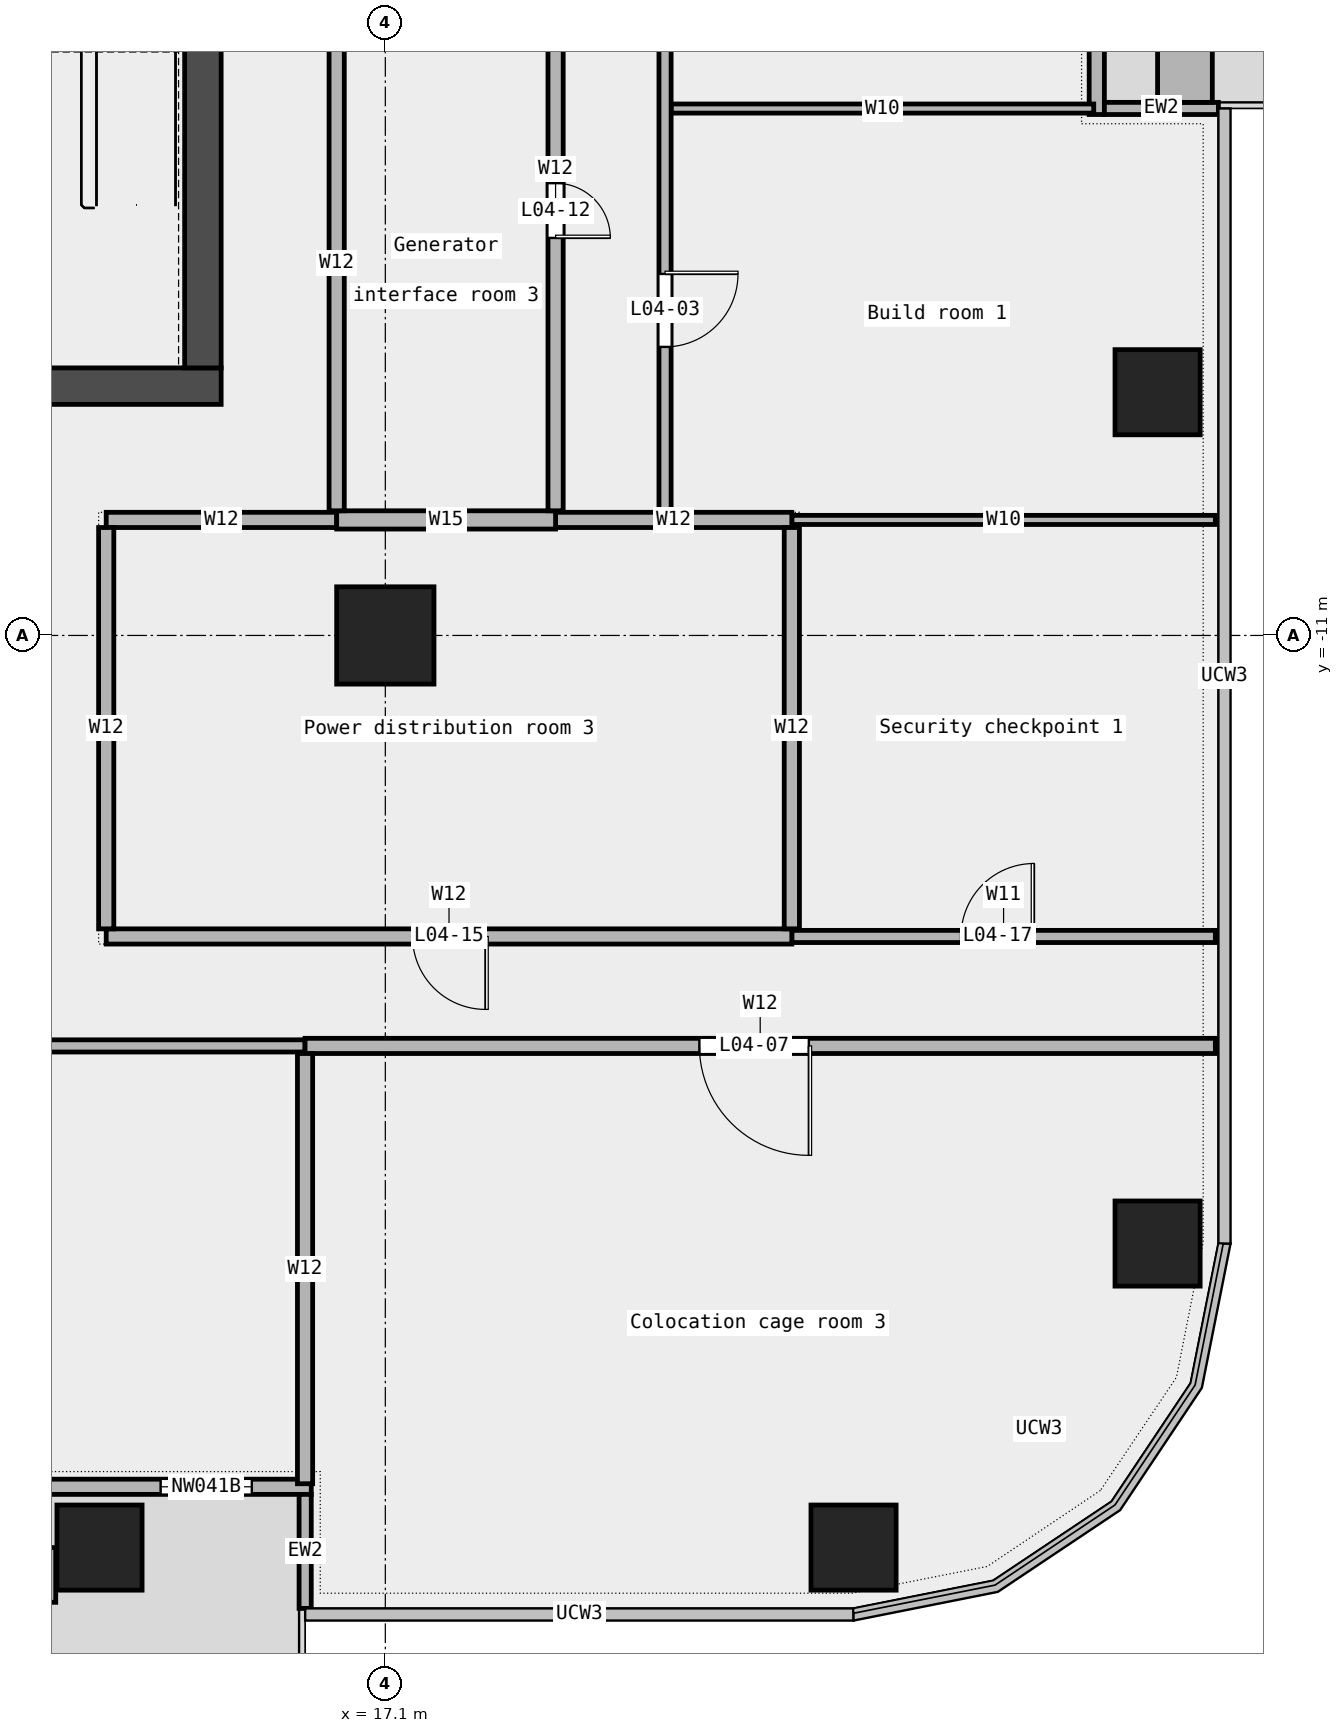
"""IFC4 building model, lengths in metres.
Left out: names, types, materials, properties, quantities, classifications, styles, units other than length and angle.
Written with IfcOpenShell. Run it as: python <this file> out.ifc"""

import sys

from ifc_helpers import new_model, si_unit, direction, frame, frame_2d, origin, origin_2d, place, context, subcontext, project, spatial, rectangle, extrude, element, fill, save


model = new_model("IFC4")
c1 = context("Model", 3, precision=1e-05, world=origin(), true_north=direction((0.0, 1.0)))
c2 = subcontext(c1, "Body", "Model", "MODEL_VIEW")
j1 = project(units=[si_unit("LENGTHUNIT", "METRE"), si_unit("PLANEANGLEUNIT", "RADIAN")], contexts=[c1])
p1 = place(None, origin())
s1 = spatial("IfcSite", under=j1, at=p1, CompositionType="ELEMENT")
p2 = place(p1, origin())
s2 = spatial("IfcBuilding", under=s1, at=p2, CompositionType="ELEMENT")
p3 = place(p2, frame((0.0, 0.0, 25.5)))
s3 = spatial("IfcBuildingStorey", under=s2, at=p3, CompositionType="ELEMENT", Elevation=25.5)
for number, where, z_axis, x_axis in (
    (1, (12.4, -26.0, 0.0), (0.0, 0.0, 1.0), (1.0, 0.0, 0.0)),
    (2, (24.8, -26.0, 0.0), (0.0, 0.0, 1.0), (1.0, 0.0, 0.0)),
    (3, (29.8, -21.0, 0.0), (0.0, 0.0, 1.0), (1.0, 0.0, 0.0)),
    (4, (29.8, -7.0, 0.0), (0.0, 0.0, 1.0), (1.0, 0.0, 0.0)),
):
    element("IfcColumn", number, at=place(p3, frame(where, z_axis=z_axis, x_axis=x_axis)), inside=s3, PredefinedType="COLUMN", context=c2, shape_type="SweptSolid", body=[
        extrude(rectangle(XDim=1.4, YDim=1.4, at=origin_2d()), origin(), (0.0, 0.0, 1.0), 5.05),
    ])
p4 = place(p3, frame((17.1, -11.0, 0.0), z_axis=(0.0, 0.0, 1.0), x_axis=(1.0, 0.0, 0.0)))
e5 = element("IfcColumn", 5, at=p4, inside=s3, PredefinedType="COLUMN", context=c2, shape_type="SweptSolid", body=[
    extrude(rectangle(XDim=1.6, YDim=1.6, at=origin_2d()), origin(), (0.0, 0.0, 1.0), 5.05),
])
p5 = place(p3, frame((2.155, -25.0, 0.0), z_axis=(0.0, 0.0, 1.0), x_axis=(1.0, 0.0, 0.0)))
e6 = element("IfcWall", 6, at=p5, inside=s3, PredefinedType="STANDARD", context=c2, shape_type="SweptSolid", body=[
    extrude(rectangle(XDim=13.727, YDim=0.25, at=frame_2d((6.864, 0.0))), origin(), (0.0, 0.0, 1.0), 5.05),
])
p6 = place(p5, frame((1.75, 0.0, 0.45)))
e7 = element("IfcOpeningElement", 7, at=p6, cuts=e6, PredefinedType="OPENING", context=c2, shape_type="SweptSolid", body=[
    extrude(rectangle(XDim=1.5, YDim=3.0, at=frame_2d((0.75, 1.5))), frame((0.0, 0.137, 0.0), z_axis=(0.0, -1.0, 0.0), x_axis=(1.0, 0.0, 0.0)), (0.0, 0.0, 1.0), 0.274),
])
p7 = place(p5, frame((6.0, 0.0, 0.0)))
e8 = element("IfcOpeningElement", 8, at=p7, cuts=e6, PredefinedType="OPENING", context=c2, shape_type="SweptSolid", body=[
    extrude(rectangle(XDim=1.8, YDim=2.4, at=frame_2d((0.9, 1.2))), frame((0.0, 0.137, 0.0), z_axis=(0.0, -1.0, 0.0), x_axis=(1.0, 0.0, 0.0)), (0.0, 0.0, 1.0), 0.274),
])
p8 = place(p5, frame((11.25, 0.0, 0.45)))
e9 = element("IfcOpeningElement", 9, at=p8, cuts=e6, PredefinedType="OPENING", context=c2, shape_type="SweptSolid", body=[
    extrude(rectangle(XDim=1.5, YDim=3.0, at=frame_2d((0.75, 1.5))), frame((0.0, 0.137, 0.0), z_axis=(0.0, -1.0, 0.0), x_axis=(1.0, 0.0, 0.0)), (0.0, 0.0, 1.0), 0.274),
])
p9 = place(p3, frame((15.782, -27.0, 0.0), z_axis=(0.0, 0.0, 1.0), x_axis=(0.0, 1.0, 0.0)))
e10 = element("IfcWall", 10, at=p9, inside=s3, PredefinedType="STANDARD", context=c2, shape_type="SweptSolid", body=[
    extrude(rectangle(XDim=1.875, YDim=0.2, at=frame_2d((0.938, 0.0))), origin(), (0.0, 0.0, 1.0), 5.05),
])
p10 = place(p3, frame((8.08, -26.45, 0.0), z_axis=(0.0, 0.0, 1.0), x_axis=(1.0, 0.0, 0.0)))
e11 = element("IfcWall", 11, at=p10, inside=s3, PredefinedType="STANDARD", context=c2, shape_type="SweptSolid", body=[
    extrude(rectangle(XDim=3.6, YDim=0.9, at=frame_2d((1.8, 0.0))), origin(), (0.0, 0.0, 1.0), 0.7),
])
p11 = place(p3, frame((28.8, -2.433, 0.0), z_axis=(0.0, 0.0, 1.0), x_axis=(0.0, 1.0, 0.0)))
e12 = element("IfcWall", 12, at=p11, inside=s3, PredefinedType="STANDARD", context=c2, shape_type="SweptSolid", body=[
    extrude(rectangle(XDim=14.2, YDim=0.25, at=frame_2d((7.1, 0.0))), origin(), (0.0, 0.0, 1.0), 5.05),
])
p12 = place(p11, frame((1.75, 0.0, 0.45)))
e13 = element("IfcOpeningElement", 13, at=p12, cuts=e12, PredefinedType="OPENING", context=c2, shape_type="SweptSolid", body=[
    extrude(rectangle(XDim=1.5, YDim=3.0, at=frame_2d((0.75, 1.5))), frame((0.0, 0.137, 0.0), z_axis=(0.0, -1.0, 0.0), x_axis=(1.0, 0.0, 0.0)), (0.0, 0.0, 1.0), 0.274),
])
p13 = place(p11, frame((6.25, 0.0, 0.0)))
e14 = element("IfcOpeningElement", 14, at=p13, cuts=e12, PredefinedType="OPENING", context=c2, shape_type="SweptSolid", body=[
    extrude(rectangle(XDim=1.8, YDim=2.4, at=frame_2d((0.9, 1.2))), frame((0.0, 0.137, 0.0), z_axis=(0.0, -1.0, 0.0), x_axis=(1.0, 0.0, 0.0)), (0.0, 0.0, 1.0), 0.274),
])
p14 = place(p11, frame((11.0, 0.0, 0.45)))
e15 = element("IfcOpeningElement", 15, at=p14, cuts=e12, PredefinedType="OPENING", context=c2, shape_type="SweptSolid", body=[
    extrude(rectangle(XDim=1.5, YDim=3.0, at=frame_2d((0.75, 1.5))), frame((0.0, 0.137, 0.0), z_axis=(0.0, -1.0, 0.0), x_axis=(1.0, 0.0, 0.0)), (0.0, 0.0, 1.0), 0.274),
])
p15 = place(p3, frame((30.8, -2.333, 0.0), z_axis=(0.0, 0.0, 1.0), x_axis=(-1.0, 0.0, 0.0)))
e16 = element("IfcWall", 16, at=p15, inside=s3, PredefinedType="STANDARD", context=c2, shape_type="SweptSolid", body=[
    extrude(rectangle(XDim=1.875, YDim=0.2, at=frame_2d((0.938, 0.0))), origin(), (0.0, 0.0, 1.0), 5.05),
])
p16 = place(p3, frame((30.25, -2.233, 0.0), z_axis=(0.0, 0.0, 1.0), x_axis=(0.0, 1.0, 0.0)))
e17 = element("IfcWall", 17, at=p16, inside=s3, PredefinedType="STANDARD", context=c2, shape_type="SweptSolid", body=[
    extrude(rectangle(XDim=3.6, YDim=0.9, at=frame_2d((1.8, 0.0))), origin(), (0.0, 0.0, 1.0), 0.7),
])
p17 = place(p3, frame((2.255, -17.75, 0.0), z_axis=(0.0, 0.0, 1.0), x_axis=(1.0, 0.0, 0.0)))
e18 = element("IfcWall", 18, at=p17, inside=s3, PredefinedType="PARTITIONING", context=c2, shape_type="SweptSolid", body=[
    extrude(rectangle(XDim=13.525, YDim=0.2, at=frame_2d((6.763, 0.0))), origin(), (0.0, 0.0, 1.0), 5.05),
])
p18 = place(p17, frame((6.012, 0.0, 0.0)))
e19 = element("IfcOpeningElement", 19, at=p18, cuts=e18, PredefinedType="OPENING", context=c2, shape_type="SweptSolid", body=[
    extrude(rectangle(XDim=1.5, YDim=2.1, at=frame_2d((0.75, 1.05))), frame((0.0, 0.112, 0.0), z_axis=(0.0, -1.0, 0.0), x_axis=(1.0, 0.0, 0.0)), (0.0, 0.0, 1.0), 0.224),
])
p19 = place(p3, frame((15.78, -17.75, 0.0), z_axis=(0.0, 0.0, 1.0), x_axis=(1.0, 0.0, 0.0)))
e20 = element("IfcWall", 20, at=p19, inside=s3, PredefinedType="PARTITIONING", context=c2, shape_type="SweptSolid", body=[
    extrude(rectangle(XDim=14.97, YDim=0.25, at=frame_2d((7.485, 0.0))), origin(), (0.0, 0.0, 1.0), 5.05),
])
p20 = place(p19, frame((6.485, 0.0, 0.0)))
e21 = element("IfcOpeningElement", 21, at=p20, cuts=e20, PredefinedType="OPENING", context=c2, shape_type="SweptSolid", body=[
    extrude(rectangle(XDim=1.8, YDim=2.1, at=frame_2d((0.9, 1.05))), frame((0.0, 0.137, 0.0), z_axis=(0.0, -1.0, 0.0), x_axis=(1.0, 0.0, 0.0)), (0.0, 0.0, 1.0), 0.274),
])
p21 = place(p3, frame((23.785, -15.95, 0.0), z_axis=(0.0, 0.0, 1.0), x_axis=(1.0, 0.0, 0.0)))
e22 = element("IfcWall", 22, at=p21, inside=s3, PredefinedType="PARTITIONING", context=c2, shape_type="SweptSolid", body=[
    extrude(rectangle(XDim=6.965, YDim=0.2, at=frame_2d((3.482, 0.0))), origin(), (0.0, 0.0, 1.0), 5.05),
])
p22 = place(p21, frame((2.782, 0.0, 0.0)))
e23 = element("IfcOpeningElement", 23, at=p22, cuts=e22, PredefinedType="OPENING", context=c2, shape_type="SweptSolid", body=[
    extrude(rectangle(XDim=1.2, YDim=2.1, at=frame_2d((0.6, 1.05))), frame((0.0, 0.112, 0.0), z_axis=(0.0, -1.0, 0.0), x_axis=(1.0, 0.0, 0.0)), (0.0, 0.0, 1.0), 0.224),
])
p23 = place(p3, frame((12.51, -15.95, 0.0), z_axis=(0.0, 0.0, 1.0), x_axis=(1.0, 0.0, 0.0)))
e24 = element("IfcWall", 24, at=p23, inside=s3, PredefinedType="PARTITIONING", context=c2, shape_type="SweptSolid", body=[
    extrude(rectangle(XDim=11.275, YDim=0.25, at=frame_2d((5.637, 0.0))), origin(), (0.0, 0.0, 1.0), 5.05),
])
p24 = place(p23, frame((5.038, 0.0, 0.0)))
e25 = element("IfcOpeningElement", 25, at=p24, cuts=e24, PredefinedType="OPENING", context=c2, shape_type="SweptSolid", body=[
    extrude(rectangle(XDim=1.2, YDim=2.1, at=frame_2d((0.6, 1.05))), frame((0.0, 0.137, 0.0), z_axis=(0.0, -1.0, 0.0), x_axis=(1.0, 0.0, 0.0)), (0.0, 0.0, 1.0), 0.274),
])
p25 = place(p3, frame((23.785, -9.1, 0.0), z_axis=(0.0, 0.0, 1.0), x_axis=(1.0, 0.0, 0.0)))
e26 = element("IfcWall", 26, at=p25, inside=s3, PredefinedType="PARTITIONING", context=c2, shape_type="SweptSolid", body=[
    extrude(rectangle(XDim=6.965, YDim=0.15, at=frame_2d((3.482, 0.0))), origin(), (0.0, 0.0, 1.0), 5.05),
])
p26 = place(p3, frame((12.51, -9.1, 0.0), z_axis=(0.0, 0.0, 1.0), x_axis=(1.0, 0.0, 0.0)))
e27 = element("IfcWall", 27, at=p26, inside=s3, PredefinedType="PARTITIONING", context=c2, shape_type="SweptSolid", body=[
    extrude(rectangle(XDim=3.79, YDim=0.25, at=frame_2d((1.895, 0.0))), origin(), (0.0, 0.0, 1.0), 5.05),
])
p27 = place(p3, frame((19.9, -9.1, 0.0), z_axis=(0.0, 0.0, 1.0), x_axis=(1.0, 0.0, 0.0)))
e28 = element("IfcWall", 28, at=p27, inside=s3, PredefinedType="PARTITIONING", context=c2, shape_type="SweptSolid", body=[
    extrude(rectangle(XDim=3.885, YDim=0.25, at=frame_2d((1.942, 0.0))), origin(), (0.0, 0.0, 1.0), 5.05),
])
p28 = place(p3, frame((16.3, -9.1, 0.0), z_axis=(0.0, 0.0, 1.0), x_axis=(1.0, 0.0, 0.0)))
e29 = element("IfcWall", 29, at=p28, inside=s3, PredefinedType="PARTITIONING", context=c2, shape_type="SweptSolid", body=[
    extrude(rectangle(XDim=3.6, YDim=0.3, at=frame_2d((1.8, 0.0))), origin(), (0.0, 0.0, 1.0), 5.05),
])
p29 = place(p3, frame((21.8, -2.335, 0.0), z_axis=(0.0, 0.0, 1.0), x_axis=(1.0, 0.0, 0.0)))
e30 = element("IfcWall", 30, at=p29, inside=s3, PredefinedType="PARTITIONING", context=c2, shape_type="SweptSolid", body=[
    extrude(rectangle(XDim=6.95, YDim=0.15, at=frame_2d((3.475, 0.0))), origin(), (0.0, 0.0, 1.0), 5.05),
])
p30 = place(p3, frame((12.51, -15.825, 0.0), z_axis=(0.0, 0.0, 1.0), x_axis=(0.0, 1.0, 0.0)))
e31 = element("IfcWall", 31, at=p30, inside=s3, PredefinedType="PARTITIONING", context=c2, shape_type="SweptSolid", body=[
    extrude(rectangle(XDim=6.6, YDim=0.25, at=frame_2d((3.3, 0.0))), origin(), (0.0, 0.0, 1.0), 5.05),
])
p31 = place(p3, frame((15.78, -24.95, 0.0), z_axis=(0.0, 0.0, 1.0), x_axis=(0.0, 1.0, 0.0)))
e32 = element("IfcWall", 32, at=p31, inside=s3, PredefinedType="PARTITIONING", context=c2, shape_type="SweptSolid", body=[
    extrude(rectangle(XDim=7.075, YDim=0.25, at=frame_2d((3.538, 0.0))), origin(), (0.0, 0.0, 1.0), 5.05),
])
p32 = place(p3, frame((16.3, -8.95, 0.0), z_axis=(0.0, 0.0, 1.0), x_axis=(0.0, 1.0, 0.0)))
e33 = element("IfcWall", 33, at=p32, inside=s3, PredefinedType="PARTITIONING", context=c2, shape_type="SweptSolid", body=[
    extrude(rectangle(XDim=8.15, YDim=0.25, at=frame_2d((4.075, 0.0))), origin(), (0.0, 0.0, 1.0), 5.05),
])
p33 = place(p3, frame((19.9, -8.95, 0.0), z_axis=(0.0, 0.0, 1.0), x_axis=(0.0, 1.0, 0.0)))
e34 = element("IfcWall", 34, at=p33, inside=s3, PredefinedType="PARTITIONING", context=c2, shape_type="SweptSolid", body=[
    extrude(rectangle(XDim=9.875, YDim=0.25, at=frame_2d((4.938, 0.0))), origin(), (0.0, 0.0, 1.0), 5.05),
])
p34 = place(p33, frame((4.488, 0.0, 0.0)))
e35 = element("IfcOpeningElement", 35, at=p34, cuts=e34, PredefinedType="OPENING", context=c2, shape_type="SweptSolid", body=[
    extrude(rectangle(XDim=0.9, YDim=2.1, at=frame_2d((0.45, 1.05))), frame((0.0, 0.137, 0.0), z_axis=(0.0, -1.0, 0.0), x_axis=(1.0, 0.0, 0.0)), (0.0, 0.0, 1.0), 0.274),
])
p35 = place(p3, frame((21.7, -8.975, 0.0), z_axis=(0.0, 0.0, 1.0), x_axis=(0.0, 1.0, 0.0)))
e36 = element("IfcWall", 36, at=p35, inside=s3, PredefinedType="PARTITIONING", context=c2, shape_type="SweptSolid", body=[
    extrude(rectangle(XDim=20.515, YDim=0.2, at=frame_2d((10.258, 0.0))), origin(), (0.0, 0.0, 1.0), 5.05),
])
p36 = place(p35, frame((2.72, 0.0, 0.0)))
e37 = element("IfcOpeningElement", 37, at=p36, cuts=e36, PredefinedType="OPENING", context=c2, shape_type="SweptSolid", body=[
    extrude(rectangle(XDim=1.2, YDim=2.1, at=frame_2d((0.6, 1.05))), frame((0.0, 0.112, 0.0), z_axis=(0.0, -1.0, 0.0), x_axis=(1.0, 0.0, 0.0)), (0.0, 0.0, 1.0), 0.224),
])
p37 = place(p35, frame((12.827, 0.0, 0.0)))
e38 = element("IfcOpeningElement", 38, at=p37, cuts=e36, PredefinedType="OPENING", context=c2, shape_type="SweptSolid", body=[
    extrude(rectangle(XDim=1.5, YDim=2.1, at=frame_2d((0.75, 1.05))), frame((0.0, 0.112, 0.0), z_axis=(0.0, -1.0, 0.0), x_axis=(1.0, 0.0, 0.0)), (0.0, 0.0, 1.0), 0.224),
])
p38 = place(p3, frame((23.785, -15.825, 0.0), z_axis=(0.0, 0.0, 1.0), x_axis=(0.0, 1.0, 0.0)))
e39 = element("IfcWall", 39, at=p38, inside=s3, PredefinedType="PARTITIONING", context=c2, shape_type="SweptSolid", body=[
    extrude(rectangle(XDim=6.6, YDim=0.25, at=frame_2d((3.3, 0.0))), origin(), (0.0, 0.0, 1.0), 5.05),
])
p39 = place(p3, frame((-14.4, -6.9, 0.0), z_axis=(0.0, 0.0, 1.0), x_axis=(1.0, 0.0, 0.0)))
e40 = element("IfcWall", 40, at=p39, inside=s3, PredefinedType="SHEAR", context=c2, shape_type="SweptSolid", body=[
    extrude(rectangle(XDim=28.8, YDim=0.6, at=frame_2d((14.4, 0.0))), origin(), (0.0, 0.0, 1.0), 5.2),
])
p40 = place(p39, frame((6.3, 0.0, 0.0)))
e41 = element("IfcOpeningElement", 41, at=p40, cuts=e40, PredefinedType="OPENING", context=c2, shape_type="SweptSolid", body=[
    extrude(rectangle(XDim=1.2, YDim=2.1, at=frame_2d((0.6, 1.05))), frame((0.0, 0.312, 0.0), z_axis=(0.0, -1.0, 0.0), x_axis=(1.0, 0.0, 0.0)), (0.0, 0.0, 1.0), 0.624),
])
p41 = place(p39, frame((10.525, 0.0, 0.0)))
e42 = element("IfcOpeningElement", 42, at=p41, cuts=e40, PredefinedType="OPENING", context=c2, shape_type="SweptSolid", body=[
    extrude(rectangle(XDim=1.0, YDim=2.1, at=frame_2d((0.5, 1.05))), frame((0.0, 0.312, 0.0), z_axis=(0.0, -1.0, 0.0), x_axis=(1.0, 0.0, 0.0)), (0.0, 0.0, 1.0), 0.624),
])
p42 = place(p39, frame((12.775, 0.0, 0.0)))
e43 = element("IfcOpeningElement", 43, at=p42, cuts=e40, PredefinedType="OPENING", context=c2, shape_type="SweptSolid", body=[
    extrude(rectangle(XDim=1.0, YDim=2.1, at=frame_2d((0.5, 1.05))), frame((0.0, 0.312, 0.0), z_axis=(0.0, -1.0, 0.0), x_axis=(1.0, 0.0, 0.0)), (0.0, 0.0, 1.0), 0.624),
])
p43 = place(p39, frame((15.212, 0.0, 0.0)))
e44 = element("IfcOpeningElement", 44, at=p43, cuts=e40, PredefinedType="OPENING", context=c2, shape_type="SweptSolid", body=[
    extrude(rectangle(XDim=1.0, YDim=2.1, at=frame_2d((0.5, 1.05))), frame((0.0, 0.312, 0.0), z_axis=(0.0, -1.0, 0.0), x_axis=(1.0, 0.0, 0.0)), (0.0, 0.0, 1.0), 0.624),
])
p44 = place(p39, frame((18.75, 0.0, 0.0)))
e45 = element("IfcOpeningElement", 45, at=p44, cuts=e40, PredefinedType="OPENING", context=c2, shape_type="SweptSolid", body=[
    extrude(rectangle(XDim=1.8, YDim=2.1, at=frame_2d((0.9, 1.05))), frame((0.0, 0.312, 0.0), z_axis=(0.0, -1.0, 0.0), x_axis=(1.0, 0.0, 0.0)), (0.0, 0.0, 1.0), 0.624),
])
p45 = place(p39, frame((23.087, 0.0, 0.0)))
e46 = element("IfcOpeningElement", 46, at=p45, cuts=e40, PredefinedType="OPENING", context=c2, shape_type="SweptSolid", body=[
    extrude(rectangle(XDim=1.0, YDim=2.1, at=frame_2d((0.5, 1.05))), frame((0.0, 0.312, 0.0), z_axis=(0.0, -1.0, 0.0), x_axis=(1.0, 0.0, 0.0)), (0.0, 0.0, 1.0), 0.624),
])
p46 = place(p3, frame((14.1, -6.6, 0.0), z_axis=(0.0, 0.0, 1.0), x_axis=(0.0, 1.0, 0.0)))
e47 = element("IfcWall", 47, at=p46, inside=s3, PredefinedType="SHEAR", context=c2, shape_type="SweptSolid", body=[
    extrude(rectangle(XDim=19.5, YDim=0.6, at=frame_2d((9.75, 0.0))), origin(), (0.0, 0.0, 1.0), 5.2),
])
p47 = place(p46, frame((9.3, 0.0, 0.0)))
e48 = element("IfcOpeningElement", 48, at=p47, cuts=e47, PredefinedType="OPENING", context=c2, shape_type="SweptSolid", body=[
    extrude(rectangle(XDim=1.8, YDim=2.1, at=frame_2d((0.9, 1.05))), frame((0.0, 0.312, 0.0), z_axis=(0.0, -1.0, 0.0), x_axis=(1.0, 0.0, 0.0)), (0.0, 0.0, 1.0), 0.624),
])
p48 = place(p8, origin())
e49 = element("IfcWindow", 49, at=p48, inside=s3, PartitioningType="SINGLE_PANEL", PredefinedType="WINDOW", context=c2, shape_type="SweptSolid", body=[
    extrude(rectangle(XDim=1.5, YDim=3.0, at=frame_2d((0.75, 1.5))), frame((0.0, 0.03, 0.0), z_axis=(0.0, -1.0, 0.0), x_axis=(1.0, 0.0, 0.0)), (0.0, 0.0, 1.0), 0.06),
])
fill(e9, e49)
p49 = place(p36, origin())
e50 = element("IfcDoor", 50, at=p49, inside=s3, OperationType="SINGLE_SWING_LEFT", PredefinedType="DOOR", context=c2, shape_type="SweptSolid", body=[
    extrude(rectangle(XDim=1.2, YDim=2.1, at=frame_2d((0.6, 1.05))), frame((0.0, 0.025, 0.0), z_axis=(0.0, -1.0, 0.0), x_axis=(1.0, 0.0, 0.0)), (0.0, 0.0, 1.0), 0.05),
])
fill(e37, e50)
p50 = place(p20, origin())
e51 = element("IfcDoor", 51, at=p50, inside=s3, OperationType="DOUBLE_DOOR_SINGLE_SWING", PredefinedType="DOOR", context=c2, shape_type="SweptSolid", body=[
    extrude(rectangle(XDim=1.8, YDim=2.1, at=frame_2d((0.9, 1.05))), frame((0.0, 0.025, 0.0), z_axis=(0.0, -1.0, 0.0), x_axis=(1.0, 0.0, 0.0)), (0.0, 0.0, 1.0), 0.05),
])
fill(e21, e51)
p51 = place(p34, origin())
e52 = element("IfcDoor", 52, at=p51, inside=s3, OperationType="SINGLE_SWING_RIGHT", PredefinedType="DOOR", context=c2, shape_type="SweptSolid", body=[
    extrude(rectangle(XDim=0.9, YDim=2.1, at=frame_2d((0.45, 1.05))), frame((0.0, 0.025, 0.0), z_axis=(0.0, -1.0, 0.0), x_axis=(1.0, 0.0, 0.0)), (0.0, 0.0, 1.0), 0.05),
])
fill(e35, e52)
p52 = place(p24, origin())
e53 = element("IfcDoor", 53, at=p52, inside=s3, OperationType="SINGLE_SWING_LEFT", PredefinedType="DOOR", context=c2, shape_type="SweptSolid", body=[
    extrude(rectangle(XDim=1.2, YDim=2.1, at=frame_2d((0.6, 1.05))), frame((0.0, 0.025, 0.0), z_axis=(0.0, -1.0, 0.0), x_axis=(1.0, 0.0, 0.0)), (0.0, 0.0, 1.0), 0.05),
])
fill(e25, e53)
p53 = place(p22, origin())
e54 = element("IfcDoor", 54, at=p53, inside=s3, OperationType="SINGLE_SWING_RIGHT", PredefinedType="DOOR", context=c2, shape_type="SweptSolid", body=[
    extrude(rectangle(XDim=1.2, YDim=2.1, at=frame_2d((0.6, 1.05))), frame((0.0, 0.025, 0.0), z_axis=(0.0, -1.0, 0.0), x_axis=(1.0, 0.0, 0.0)), (0.0, 0.0, 1.0), 0.05),
])
fill(e23, e54)
save(model, sys.argv[1])
